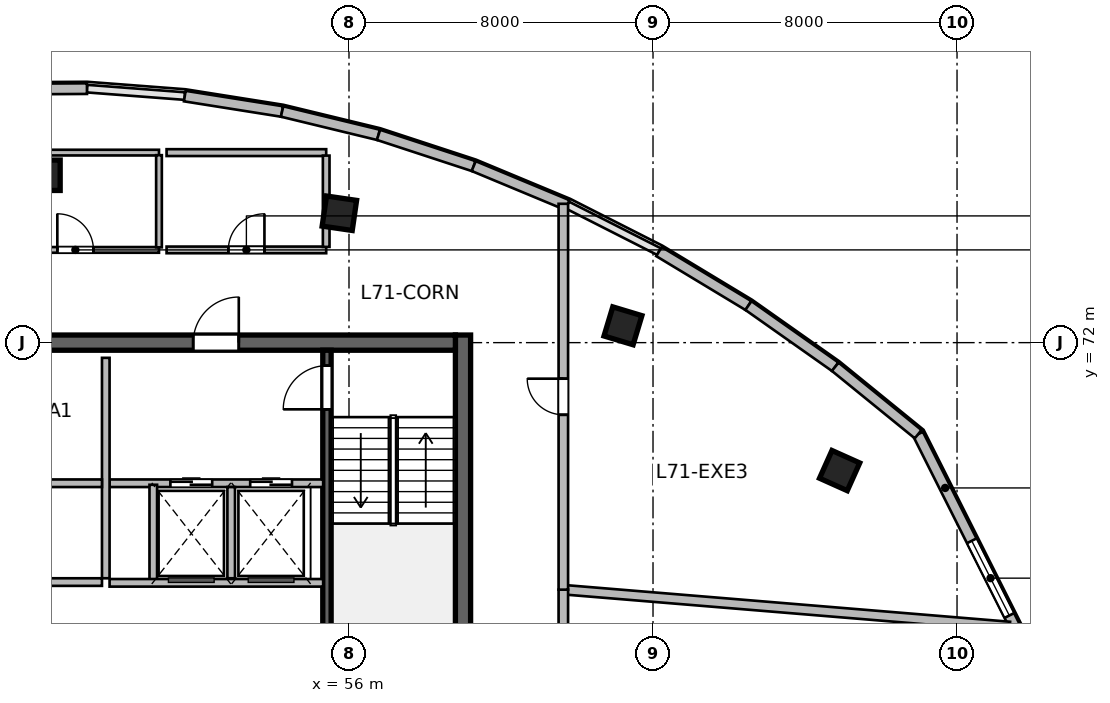
"""IFC4 building model, lengths in metres.
Left out: names, types, materials, properties, quantities, classifications, styles, units other than length and angle.
Written with IfcOpenShell. Run it as: python <this file> out.ifc"""

import sys

from ifc_helpers import new_model, si_unit, direction, frame, frame_2d, origin, origin_2d, place, context, subcontext, project, spatial, rectangle, extrude, source, transform, mapped, element, fill, save


model = new_model("IFC4")
c1 = context("Model", 3, precision=1e-05, world=origin(), true_north=direction((0.0, 1.0)))
c2 = subcontext(c1, "Body", "Model", "MODEL_VIEW")
j1 = project(units=[si_unit("LENGTHUNIT", "METRE"), si_unit("PLANEANGLEUNIT", "RADIAN")], contexts=[c1])
p1 = place(None, origin())
s1 = spatial("IfcSite", under=j1, at=p1, CompositionType="ELEMENT")
p2 = place(p1, origin())
s2 = spatial("IfcBuilding", under=s1, at=p2, CompositionType="ELEMENT")
p3 = place(p2, frame((0.0, 0.0, 291.3)))
s3 = spatial("IfcBuildingStorey", under=s2, at=p3, CompositionType="ELEMENT", Elevation=291.3)
m1 = source(origin(), c2, "Body", "SweptSolid", [
    extrude(rectangle(XDim=12.0, YDim=0.4, at=frame_2d((6.0, 0.0))), origin(), (0.0, 0.0, 1.0), 3.9),
])
p4 = place(p3, frame((59.0, 60.2, 0.0), z_axis=(0.0, 0.0, 1.0), x_axis=(0.0, 1.0, 0.0)))
e1 = element("IfcWall", 1, at=p4, inside=s3, PredefinedType="SHEAR", context=c2, shape_type="MappedRepresentation", body=[
    mapped(m1, transform((0.0, 0.0, 0.0), scale=1.0)),
])
m2 = source(origin(), c2, "Body", "SweptSolid", [
    extrude(rectangle(XDim=21.6, YDim=0.4, at=frame_2d((10.8, 0.0))), origin(), (0.0, 0.0, 1.0), 3.9),
])
p5 = place(p3, frame((37.2, 72.0, 0.0), z_axis=(0.0, 0.0, 1.0), x_axis=(1.0, 0.0, 0.0)))
e2 = element("IfcWall", 2, at=p5, inside=s3, PredefinedType="SHEAR", context=c2, shape_type="MappedRepresentation", body=[
    mapped(m2, transform((0.0, 0.0, 0.0), scale=1.0)),
])
p6 = place(p5, frame((1.2, 0.0, 0.0)))
e3 = element("IfcOpeningElement", 3, at=p6, cuts=e2, PredefinedType="OPENING", context=c2, shape_type="SweptSolid", body=[
    extrude(rectangle(XDim=0.9, YDim=2.1, at=frame_2d((0.45, 1.05))), frame((0.0, 0.21, 0.0), z_axis=(0.0, -1.0, 0.0), x_axis=(1.0, 0.0, 0.0)), (0.0, 0.0, 1.0), 0.42),
])
p7 = place(p5, frame((14.7, 0.0, 0.0)))
e4 = element("IfcOpeningElement", 4, at=p7, cuts=e2, PredefinedType="OPENING", context=c2, shape_type="SweptSolid", body=[
    extrude(rectangle(XDim=1.2, YDim=2.15, at=frame_2d((0.6, 1.075))), frame((0.0, 0.21, 0.0), z_axis=(0.0, -1.0, 0.0), x_axis=(1.0, 0.0, 0.0)), (0.0, 0.0, 1.0), 0.42),
])
p8 = place(p5, frame((4.15, 0.0, 0.0)))
e5 = element("IfcOpeningElement", 5, at=p8, cuts=e2, PredefinedType="OPENING", context=c2, shape_type="SweptSolid", body=[
    extrude(rectangle(XDim=1.3, YDim=2.15, at=frame_2d((0.65, 1.075))), frame((0.0, 0.21, 0.0), z_axis=(0.0, -1.0, 0.0), x_axis=(1.0, 0.0, 0.0)), (0.0, 0.0, 1.0), 0.42),
])
p9 = place(p5, frame((7.1, 0.0, 0.0)))
e6 = element("IfcOpeningElement", 6, at=p9, cuts=e2, PredefinedType="OPENING", context=c2, shape_type="SweptSolid", body=[
    extrude(rectangle(XDim=0.9, YDim=2.1, at=frame_2d((0.45, 1.05))), frame((0.0, 0.21, 0.0), z_axis=(0.0, -1.0, 0.0), x_axis=(1.0, 0.0, 0.0)), (0.0, 0.0, 1.0), 0.42),
])
m3 = source(origin(), c2, "Body", "SweptSolid", [
    extrude(rectangle(XDim=11.2, YDim=0.22, at=frame_2d((5.6, 0.0))), origin(), (0.0, 0.0, 1.0), 3.9),
])
p10 = place(p3, frame((55.42, 60.6, 0.0), z_axis=(0.0, 0.0, 1.0), x_axis=(0.0, 1.0, 0.0)))
e7 = element("IfcWall", 7, at=p10, inside=s3, PredefinedType="SHEAR", context=c2, shape_type="MappedRepresentation", body=[
    mapped(m3, transform((0.0, 0.0, 0.0), scale=1.0)),
])
p11 = place(p10, frame((9.645, 0.0, 0.0)))
e8 = element("IfcOpeningElement", 8, at=p11, cuts=e7, PredefinedType="OPENING", context=c2, shape_type="SweptSolid", body=[
    extrude(rectangle(XDim=1.15, YDim=2.15, at=frame_2d((0.575, 1.075))), frame((0.0, 0.12, 0.0), z_axis=(0.0, -1.0, 0.0), x_axis=(1.0, 0.0, 0.0)), (0.0, 0.0, 1.0), 0.24),
])
m4 = source(origin(), c2, "Body", "SweptSolid", [
    extrude(rectangle(XDim=0.8, YDim=0.8, at=origin_2d()), origin(), (0.0, 0.0, 1.0), 3.9),
])
for number, where, z_axis, x_axis in (
    (9, (48.0, 76.404, 0.0), (0.0, 0.0, 1.0), (0.0, 1.0, 0.0)),
    (10, (55.747, 75.404, 0.0), (0.0, 0.0, 1.0), (0.143, 0.99, 0.0)),
    (11, (63.209, 72.442, 0.0), (0.0, 0.0, 1.0), (0.289, 0.957, 0.0)),
    (12, (68.91, 68.633, 0.0), (0.0, 0.0, 1.0), (0.409, 0.912, 0.0)),
):
    element("IfcColumn", number, at=place(p3, frame(where, z_axis=z_axis, x_axis=x_axis)), inside=s3, PredefinedType="COLUMN", context=c2, shape_type="MappedRepresentation", body=[
        mapped(m4, transform((0.0, 0.0, 0.0), scale=1.0)),
    ])
m5 = source(origin(), c2, "Body", "SweptSolid", [
    extrude(rectangle(XDim=5.653, YDim=0.28, at=frame_2d((2.827, 0.0))), origin(), (0.0, 0.0, 1.0), 3.64),
])
p12 = place(p3, frame((70.976, 69.591, 0.0), z_axis=(0.0, 0.0, 1.0), x_axis=(0.449302555419, -0.893379658205, 0.0)))
e13 = element("IfcWall", 13, at=p12, inside=s3, PredefinedType="SOLIDWALL", context=c2, shape_type="MappedRepresentation", body=[
    mapped(m5, transform((0.0, 0.0, 0.0), scale=1.0)),
])
p13 = place(p12, frame((3.14, 0.0, 0.95)))
e14 = element("IfcOpeningElement", 14, at=p13, cuts=e13, PredefinedType="OPENING", context=c2, shape_type="SweptSolid", body=[
    extrude(rectangle(XDim=2.2, YDim=2.1, at=frame_2d((1.1, 1.05))), frame((0.0, 0.15, 0.0), z_axis=(0.0, -1.0, 0.0), x_axis=(1.0, 0.0, 0.0)), (0.0, 0.0, 1.0), 0.3),
])
m6 = source(origin(), c2, "Body", "SweptSolid", [
    extrude(rectangle(XDim=2.578, YDim=0.28, at=frame_2d((1.289, 0.0))), origin(), (0.0, 0.0, 1.0), 3.64),
])
p14 = place(p3, frame((46.527, 78.668, 0.0), z_axis=(0.0, 0.0, 1.0), x_axis=(0.999982204439, 0.005965802924, 0.0)))
e15 = element("IfcWall", 15, at=p14, inside=s3, PredefinedType="SOLIDWALL", context=c2, shape_type="MappedRepresentation", body=[
    mapped(m6, transform((0.0, 0.0, 0.0), scale=1.0)),
])
m7 = source(origin(), c2, "Body", "SweptSolid", [
    extrude(rectangle(XDim=2.593, YDim=0.28, at=frame_2d((1.296, 0.0))), origin(), (0.0, 0.0, 1.0), 3.64),
])
p15 = place(p3, frame((51.679, 78.488, 0.0), z_axis=(0.0, 0.0, 1.0), x_axis=(0.987661204406, -0.156605700126, 0.0)))
e16 = element("IfcWall", 16, at=p15, inside=s3, PredefinedType="SOLIDWALL", context=c2, shape_type="MappedRepresentation", body=[
    mapped(m7, transform((0.0, 0.0, 0.0), scale=1.0)),
])
m8 = source(origin(), c2, "Body", "SweptSolid", [
    extrude(rectangle(XDim=2.611, YDim=0.28, at=frame_2d((1.305, 0.0))), origin(), (0.0, 0.0, 1.0), 3.64),
])
p16 = place(p3, frame((54.239, 78.082, 0.0), z_axis=(0.0, 0.0, 1.0), x_axis=(0.97188253817, -0.235466201396, 0.0)))
e17 = element("IfcWall", 17, at=p16, inside=s3, PredefinedType="SOLIDWALL", context=c2, shape_type="MappedRepresentation", body=[
    mapped(m8, transform((0.0, 0.0, 0.0), scale=1.0)),
])
m9 = source(origin(), c2, "Body", "SweptSolid", [
    extrude(rectangle(XDim=2.636, YDim=0.28, at=frame_2d((1.318, 0.0))), origin(), (0.0, 0.0, 1.0), 3.64),
])
p17 = place(p3, frame((56.777, 77.467, 0.0), z_axis=(0.0, 0.0, 1.0), x_axis=(0.950200321617, -0.311639774097, 0.0)))
e18 = element("IfcWall", 18, at=p17, inside=s3, PredefinedType="SOLIDWALL", context=c2, shape_type="MappedRepresentation", body=[
    mapped(m9, transform((0.0, 0.0, 0.0), scale=1.0)),
])
m10 = source(origin(), c2, "Body", "SweptSolid", [
    extrude(rectangle(XDim=2.668, YDim=0.28, at=frame_2d((1.334, 0.0))), origin(), (0.0, 0.0, 1.0), 3.64),
])
p18 = place(p3, frame((59.281, 76.645, 0.0), z_axis=(0.0, 0.0, 1.0), x_axis=(0.923290633029, -0.384102078828, 0.0)))
e19 = element("IfcWall", 19, at=p18, inside=s3, PredefinedType="SOLIDWALL", context=c2, shape_type="MappedRepresentation", body=[
    mapped(m10, transform((0.0, 0.0, 0.0), scale=1.0)),
])
m11 = source(origin(), c2, "Body", "SweptSolid", [
    extrude(rectangle(XDim=2.748, YDim=0.28, at=frame_2d((1.374, 0.0))), origin(), (0.0, 0.0, 1.0), 3.64),
])
p19 = place(p3, frame((64.157, 74.396, 0.0), z_axis=(0.0, 0.0, 1.0), x_axis=(0.856149718453, -0.516727838996, 0.0)))
e20 = element("IfcWall", 20, at=p19, inside=s3, PredefinedType="SOLIDWALL", context=c2, shape_type="MappedRepresentation", body=[
    mapped(m11, transform((0.0, 0.0, 0.0), scale=1.0)),
])
m12 = source(origin(), c2, "Body", "SweptSolid", [
    extrude(rectangle(XDim=2.795, YDim=0.28, at=frame_2d((1.397, 0.0))), origin(), (0.0, 0.0, 1.0), 3.64),
])
p20 = place(p3, frame((66.51, 72.975, 0.0), z_axis=(0.0, 0.0, 1.0), x_axis=(0.817265517835, -0.576261289136, 0.0)))
e21 = element("IfcWall", 21, at=p20, inside=s3, PredefinedType="SOLIDWALL", context=c2, shape_type="MappedRepresentation", body=[
    mapped(m12, transform((0.0, 0.0, 0.0), scale=1.0)),
])
m13 = source(origin(), c2, "Body", "SweptSolid", [
    extrude(rectangle(XDim=2.812, YDim=0.28, at=frame_2d((1.406, 0.0))), origin(), (0.0, 0.0, 1.0), 3.64),
])
p21 = place(p3, frame((68.795, 71.365, 0.0), z_axis=(0.0, 0.0, 1.0), x_axis=(0.775880230716, -0.630880232361, 0.0)))
e22 = element("IfcWall", 22, at=p21, inside=s3, PredefinedType="SOLIDWALL", context=c2, shape_type="MappedRepresentation", body=[
    mapped(m13, transform((0.0, 0.0, 0.0), scale=1.0)),
])
m14 = source(origin(), c2, "Body", "SweptSolid", [
    extrude(rectangle(XDim=5.62, YDim=0.2, at=frame_2d((2.81, 0.0))), origin(), (0.0, 0.0, 1.0), 3.64),
])
p22 = place(p3, frame((49.7, 68.3, 0.0), z_axis=(0.0, 0.0, 1.0), x_axis=(1.0, 0.0, 0.0)))
e23 = element("IfcWall", 23, at=p22, inside=s3, PredefinedType="SOLIDWALL", context=c2, shape_type="MappedRepresentation", body=[
    mapped(m14, transform((0.0, 0.0, 0.0), scale=1.0)),
])
p23 = place(p22, frame((1.6, 0.0, 0.0)))
e24 = element("IfcOpeningElement", 24, at=p23, cuts=e23, PredefinedType="OPENING", context=c2, shape_type="SweptSolid", body=[
    extrude(rectangle(XDim=1.1, YDim=2.15, at=frame_2d((0.55, 1.075))), frame((0.0, 0.11, 0.0), z_axis=(0.0, -1.0, 0.0), x_axis=(1.0, 0.0, 0.0)), (0.0, 0.0, 1.0), 0.22),
])
p24 = place(p22, frame((3.7, 0.0, 0.0)))
e25 = element("IfcOpeningElement", 25, at=p24, cuts=e23, PredefinedType="OPENING", context=c2, shape_type="SweptSolid", body=[
    extrude(rectangle(XDim=1.1, YDim=2.15, at=frame_2d((0.55, 1.075))), frame((0.0, 0.11, 0.0), z_axis=(0.0, -1.0, 0.0), x_axis=(1.0, 0.0, 0.0)), (0.0, 0.0, 1.0), 0.22),
])
m15 = source(origin(), c2, "Body", "SweptSolid", [
    extrude(rectangle(XDim=5.8, YDim=0.2, at=frame_2d((2.9, 0.0))), origin(), (0.0, 0.0, 1.0), 3.64),
])
p25 = place(p3, frame((49.6, 65.8, 0.0), z_axis=(0.0, 0.0, 1.0), x_axis=(0.0, 1.0, 0.0)))
e26 = element("IfcWall", 26, at=p25, inside=s3, PredefinedType="SOLIDWALL", context=c2, shape_type="MappedRepresentation", body=[
    mapped(m15, transform((0.0, 0.0, 0.0), scale=1.0)),
])
m16 = source(origin(), c2, "Body", "SweptSolid", [
    extrude(rectangle(XDim=2.58, YDim=0.2, at=frame_2d((1.29, 0.0))), origin(), (0.0, 0.0, 1.0), 3.64),
])
p26 = place(p3, frame((50.85, 65.68, 0.0), z_axis=(0.0, 0.0, 1.0), x_axis=(0.0, 1.0, 0.0)))
e27 = element("IfcWall", 27, at=p26, inside=s3, PredefinedType="SOLIDWALL", context=c2, shape_type="MappedRepresentation", body=[
    mapped(m16, transform((0.0, 0.0, 0.0), scale=1.0)),
])
m17 = source(origin(), c2, "Body", "SweptSolid", [
    extrude(rectangle(XDim=2.4, YDim=0.2, at=frame_2d((1.2, 0.0))), origin(), (0.0, 0.0, 1.0), 3.64),
])
p27 = place(p3, frame((52.9, 65.8, 0.0), z_axis=(0.0, 0.0, 1.0), x_axis=(0.0, 1.0, 0.0)))
e28 = element("IfcWall", 28, at=p27, inside=s3, PredefinedType="SOLIDWALL", context=c2, shape_type="MappedRepresentation", body=[
    mapped(m17, transform((0.0, 0.0, 0.0), scale=1.0)),
])
p28 = place(p3, frame((49.7, 65.68, 0.0), z_axis=(0.0, 0.0, 1.0), x_axis=(1.0, 0.0, 0.0)))
e29 = element("IfcWall", 29, at=p28, inside=s3, PredefinedType="SOLIDWALL", context=c2, shape_type="MappedRepresentation", body=[
    mapped(m14, transform((0.0, 0.0, 0.0), scale=1.0)),
])
m18 = source(origin(), c2, "Body", "SweptSolid", [
    extrude(rectangle(XDim=8.8, YDim=0.2, at=frame_2d((4.4, 0.0))), origin(), (0.0, 0.0, 1.0), 3.64),
])
p29 = place(p3, frame((40.7, 68.3, 0.0), z_axis=(0.0, 0.0, 1.0), x_axis=(1.0, 0.0, 0.0)))
e30 = element("IfcWall", 30, at=p29, inside=s3, PredefinedType="SOLIDWALL", context=c2, shape_type="MappedRepresentation", body=[
    mapped(m18, transform((0.0, 0.0, 0.0), scale=1.0)),
])
p30 = place(p3, frame((40.7, 65.7, 0.0), z_axis=(0.0, 0.0, 1.0), x_axis=(1.0, 0.0, 0.0)))
e31 = element("IfcWall", 31, at=p30, inside=s3, PredefinedType="SOLIDWALL", context=c2, shape_type="MappedRepresentation", body=[
    mapped(m18, transform((0.0, 0.0, 0.0), scale=1.0)),
])
p31 = place(p30, frame((3.8, 0.0, 0.0)))
e32 = element("IfcOpeningElement", 32, at=p31, cuts=e31, PredefinedType="OPENING", context=c2, shape_type="SweptSolid", body=[
    extrude(rectangle(XDim=0.95, YDim=2.15, at=frame_2d((0.475, 1.075))), frame((0.0, 0.11, 0.0), z_axis=(0.0, -1.0, 0.0), x_axis=(1.0, 0.0, 0.0)), (0.0, 0.0, 1.0), 0.22),
])
m19 = source(origin(), c2, "Body", "SweptSolid", [
    extrude(rectangle(XDim=4.4, YDim=0.15, at=frame_2d((2.2, 0.0))), origin(), (0.0, 0.0, 1.0), 3.64),
])
p32 = place(p3, frame((46.6, 74.44, 0.0), z_axis=(0.0, 0.0, 1.0), x_axis=(1.0, 0.0, 0.0)))
e33 = element("IfcWall", 33, at=p32, inside=s3, PredefinedType="PARTITIONING", context=c2, shape_type="MappedRepresentation", body=[
    mapped(m19, transform((0.0, 0.0, 0.0), scale=1.0)),
])
p33 = place(p32, frame((1.725, 0.0, 0.0)))
e34 = element("IfcOpeningElement", 34, at=p33, cuts=e33, PredefinedType="OPENING", context=c2, shape_type="SweptSolid", body=[
    extrude(rectangle(XDim=0.95, YDim=2.1, at=frame_2d((0.475, 1.05))), frame((0.0, 0.085, 0.0), z_axis=(0.0, -1.0, 0.0), x_axis=(1.0, 0.0, 0.0)), (0.0, 0.0, 1.0), 0.17),
])
p34 = place(p3, frame((46.6, 77.0, 0.0), z_axis=(0.0, 0.0, 1.0), x_axis=(1.0, 0.0, 0.0)))
e35 = element("IfcWall", 35, at=p34, inside=s3, PredefinedType="PARTITIONING", context=c2, shape_type="MappedRepresentation", body=[
    mapped(m19, transform((0.0, 0.0, 0.0), scale=1.0)),
])
m20 = source(origin(), c2, "Body", "SweptSolid", [
    extrude(rectangle(XDim=2.425, YDim=0.15, at=frame_2d((1.212, 0.0))), origin(), (0.0, 0.0, 1.0), 3.64),
])
p35 = place(p3, frame((51.0, 74.508, 0.0), z_axis=(0.0, 0.0, 1.0), x_axis=(0.0, 1.0, 0.0)))
e36 = element("IfcWall", 36, at=p35, inside=s3, PredefinedType="PARTITIONING", context=c2, shape_type="MappedRepresentation", body=[
    mapped(m20, transform((0.0, 0.0, 0.0), scale=1.0)),
])
m21 = source(origin(), c2, "Body", "SweptSolid", [
    extrude(rectangle(XDim=4.2, YDim=0.175, at=frame_2d((2.1, 0.0))), origin(), (0.0, 0.0, 1.0), 3.64),
])
p36 = place(p3, frame((51.2, 74.44, 0.0), z_axis=(0.0, 0.0, 1.0), x_axis=(1.0, 0.0, 0.0)))
e37 = element("IfcWall", 37, at=p36, inside=s3, PredefinedType="PARTITIONING", context=c2, shape_type="MappedRepresentation", body=[
    mapped(m21, transform((0.0, 0.0, 0.0), scale=1.0)),
])
p37 = place(p36, frame((1.625, 0.0, 0.0)))
e38 = element("IfcOpeningElement", 38, at=p37, cuts=e37, PredefinedType="OPENING", context=c2, shape_type="SweptSolid", body=[
    extrude(rectangle(XDim=0.95, YDim=2.12, at=frame_2d((0.475, 1.06))), frame((0.0, 0.098, 0.0), z_axis=(0.0, -1.0, 0.0), x_axis=(1.0, 0.0, 0.0)), (0.0, 0.0, 1.0), 0.195),
])
m22 = source(origin(), c2, "Body", "SweptSolid", [
    extrude(rectangle(XDim=4.2, YDim=0.18, at=frame_2d((2.1, 0.0))), origin(), (0.0, 0.0, 1.0), 3.64),
])
p38 = place(p3, frame((51.2, 77.0, 0.0), z_axis=(0.0, 0.0, 1.0), x_axis=(1.0, 0.0, 0.0)))
e39 = element("IfcWall", 39, at=p38, inside=s3, PredefinedType="PLUMBINGWALL", context=c2, shape_type="MappedRepresentation", body=[
    mapped(m22, transform((0.0, 0.0, 0.0), scale=1.0)),
])
m23 = source(origin(), c2, "Body", "SweptSolid", [
    extrude(rectangle(XDim=2.403, YDim=0.175, at=frame_2d((1.201, 0.0))), origin(), (0.0, 0.0, 1.0), 3.64),
])
p39 = place(p3, frame((55.4, 74.519, 0.0), z_axis=(0.0, 0.0, 1.0), x_axis=(0.0, 1.0, 0.0)))
e40 = element("IfcWall", 40, at=p39, inside=s3, PredefinedType="PARTITIONING", context=c2, shape_type="MappedRepresentation", body=[
    mapped(m23, transform((0.0, 0.0, 0.0), scale=1.0)),
])
m24 = source(origin(), c2, "Body", "SweptSolid", [
    extrude(rectangle(XDim=11.787, YDim=0.25, at=frame_2d((5.893, 0.0))), origin(), (0.0, 0.0, 1.0), 3.64),
])
p40 = place(p3, frame((61.64, 65.5, 0.0), z_axis=(0.0, 0.0, 1.0), x_axis=(0.996614976318, -0.082210637868, 0.0)))
e41 = element("IfcWall", 41, at=p40, inside=s3, PredefinedType="PARTITIONING", context=c2, shape_type="MappedRepresentation", body=[
    mapped(m24, transform((0.0, 0.0, 0.0), scale=1.0)),
])
m25 = source(origin(), c2, "Body", "SweptSolid", [
    extrude(rectangle(XDim=5.5, YDim=0.25, at=frame_2d((2.75, 0.0))), origin(), (0.0, 0.0, 1.0), 3.64),
])
p41 = place(p3, frame((61.64, 60.0, 0.0), z_axis=(0.0, 0.0, 1.0), x_axis=(0.0, 1.0, 0.0)))
e42 = element("IfcWall", 42, at=p41, inside=s3, PredefinedType="PARTITIONING", context=c2, shape_type="MappedRepresentation", body=[
    mapped(m25, transform((0.0, 0.0, 0.0), scale=1.0)),
])
p42 = place(p41, frame((1.615, 0.0, 0.0)))
e43 = element("IfcOpeningElement", 43, at=p42, cuts=e42, PredefinedType="OPENING", context=c2, shape_type="SweptSolid", body=[
    extrude(rectangle(XDim=0.95, YDim=2.1, at=frame_2d((0.475, 1.05))), frame((0.0, 0.135, 0.0), z_axis=(0.0, -1.0, 0.0), x_axis=(1.0, 0.0, 0.0)), (0.0, 0.0, 1.0), 0.27),
])
m26 = source(origin(), c2, "Body", "SweptSolid", [
    extrude(rectangle(XDim=10.153, YDim=0.25, at=frame_2d((5.077, 0.0))), origin(), (0.0, 0.0, 1.0), 3.64),
])
p43 = place(p3, frame((61.64, 65.5, 0.0), z_axis=(0.0, 0.0, 1.0), x_axis=(0.0, 1.0, 0.0)))
e44 = element("IfcWall", 44, at=p43, inside=s3, PredefinedType="PARTITIONING", context=c2, shape_type="MappedRepresentation", body=[
    mapped(m26, transform((0.0, 0.0, 0.0), scale=1.0)),
])
p44 = place(p43, frame((4.602, 0.0, 0.0)))
e45 = element("IfcOpeningElement", 45, at=p44, cuts=e44, PredefinedType="OPENING", context=c2, shape_type="SweptSolid", body=[
    extrude(rectangle(XDim=0.95, YDim=2.1, at=frame_2d((0.475, 1.05))), frame((0.0, 0.135, 0.0), z_axis=(0.0, -1.0, 0.0), x_axis=(1.0, 0.0, 0.0)), (0.0, 0.0, 1.0), 0.27),
])
m27 = source(origin(), c2, "Body", "SweptSolid", [
    extrude(rectangle(XDim=2.2, YDim=2.1, at=frame_2d((1.1, 1.05))), frame((0.0, 0.03, 0.0), z_axis=(0.0, -1.0, 0.0), x_axis=(1.0, 0.0, 0.0)), (0.0, 0.0, 1.0), 0.06),
])
p45 = place(p13, origin())
e46 = element("IfcWindow", 46, at=p45, inside=s3, PartitioningType="TRIPLE_PANEL_VERTICAL", PredefinedType="WINDOW", context=c2, shape_type="MappedRepresentation", body=[
    mapped(m27, transform((0.0, 0.0, 0.0), scale=1.0)),
])
fill(e14, e46)
m28 = source(origin(), c2, "Body", "SweptSolid", [
    extrude(rectangle(XDim=1.15, YDim=2.15, at=frame_2d((0.575, 1.075))), frame((0.0, 0.025, 0.0), z_axis=(0.0, -1.0, 0.0), x_axis=(1.0, 0.0, 0.0)), (0.0, 0.0, 1.0), 0.05),
])
p46 = place(p11, origin())
e47 = element("IfcDoor", 47, at=p46, inside=s3, OperationType="SINGLE_SWING_LEFT", PredefinedType="DOOR", context=c2, shape_type="MappedRepresentation", body=[
    mapped(m28, transform((0.0, 0.0, 0.0), scale=1.0)),
])
fill(e8, e47)
m29 = source(origin(), c2, "Body", "SweptSolid", [
    extrude(rectangle(XDim=1.2, YDim=2.15, at=frame_2d((0.6, 1.075))), frame((0.0, 0.025, 0.0), z_axis=(0.0, -1.0, 0.0), x_axis=(1.0, 0.0, 0.0)), (0.0, 0.0, 1.0), 0.05),
])
p47 = place(p7, origin())
e48 = element("IfcDoor", 48, at=p47, inside=s3, OperationType="SINGLE_SWING_RIGHT", PredefinedType="DOOR", context=c2, shape_type="MappedRepresentation", body=[
    mapped(m29, transform((0.0, 0.0, 0.0), scale=1.0)),
])
fill(e4, e48)
m30 = source(origin(), c2, "Body", "SweptSolid", [
    extrude(rectangle(XDim=1.1, YDim=2.15, at=frame_2d((0.55, 1.075))), frame((0.0, 0.025, 0.0), z_axis=(0.0, -1.0, 0.0), x_axis=(1.0, 0.0, 0.0)), (0.0, 0.0, 1.0), 0.05),
])
p48 = place(p23, origin())
e49 = element("IfcDoor", 49, at=p48, inside=s3, OperationType="DOUBLE_DOOR_SLIDING", PredefinedType="DOOR", context=c2, shape_type="MappedRepresentation", body=[
    mapped(m30, transform((0.0, 0.0, 0.0), scale=1.0)),
])
fill(e24, e49)
p49 = place(p24, origin())
e50 = element("IfcDoor", 50, at=p49, inside=s3, OperationType="DOUBLE_DOOR_SLIDING", PredefinedType="DOOR", context=c2, shape_type="MappedRepresentation", body=[
    mapped(m30, transform((0.0, 0.0, 0.0), scale=1.0)),
])
fill(e25, e50)
m31 = source(origin(), c2, "Body", "SweptSolid", [
    extrude(rectangle(XDim=0.95, YDim=2.1, at=frame_2d((0.475, 1.05))), frame((0.0, 0.025, 0.0), z_axis=(0.0, -1.0, 0.0), x_axis=(1.0, 0.0, 0.0)), (0.0, 0.0, 1.0), 0.05),
])
p50 = place(p33, origin())
e51 = element("IfcDoor", 51, at=p50, inside=s3, OperationType="SINGLE_SWING_LEFT", PredefinedType="DOOR", context=c2, shape_type="MappedRepresentation", body=[
    mapped(m31, transform((0.0, 0.0, 0.0), scale=1.0)),
])
fill(e34, e51)
m32 = source(origin(), c2, "Body", "SweptSolid", [
    extrude(rectangle(XDim=0.95, YDim=2.12, at=frame_2d((0.475, 1.06))), frame((0.0, 0.025, 0.0), z_axis=(0.0, -1.0, 0.0), x_axis=(1.0, 0.0, 0.0)), (0.0, 0.0, 1.0), 0.05),
])
p51 = place(p37, origin())
e52 = element("IfcDoor", 52, at=p51, inside=s3, OperationType="SINGLE_SWING_RIGHT", PredefinedType="DOOR", context=c2, shape_type="MappedRepresentation", body=[
    mapped(m32, transform((0.0, 0.0, 0.0), scale=1.0)),
])
fill(e38, e52)
p52 = place(p44, origin())
e53 = element("IfcDoor", 53, at=p52, inside=s3, OperationType="SINGLE_SWING_RIGHT", PredefinedType="DOOR", context=c2, shape_type="MappedRepresentation", body=[
    mapped(m31, transform((0.0, 0.0, 0.0), scale=1.0)),
])
fill(e45, e53)
save(model, sys.argv[1])
